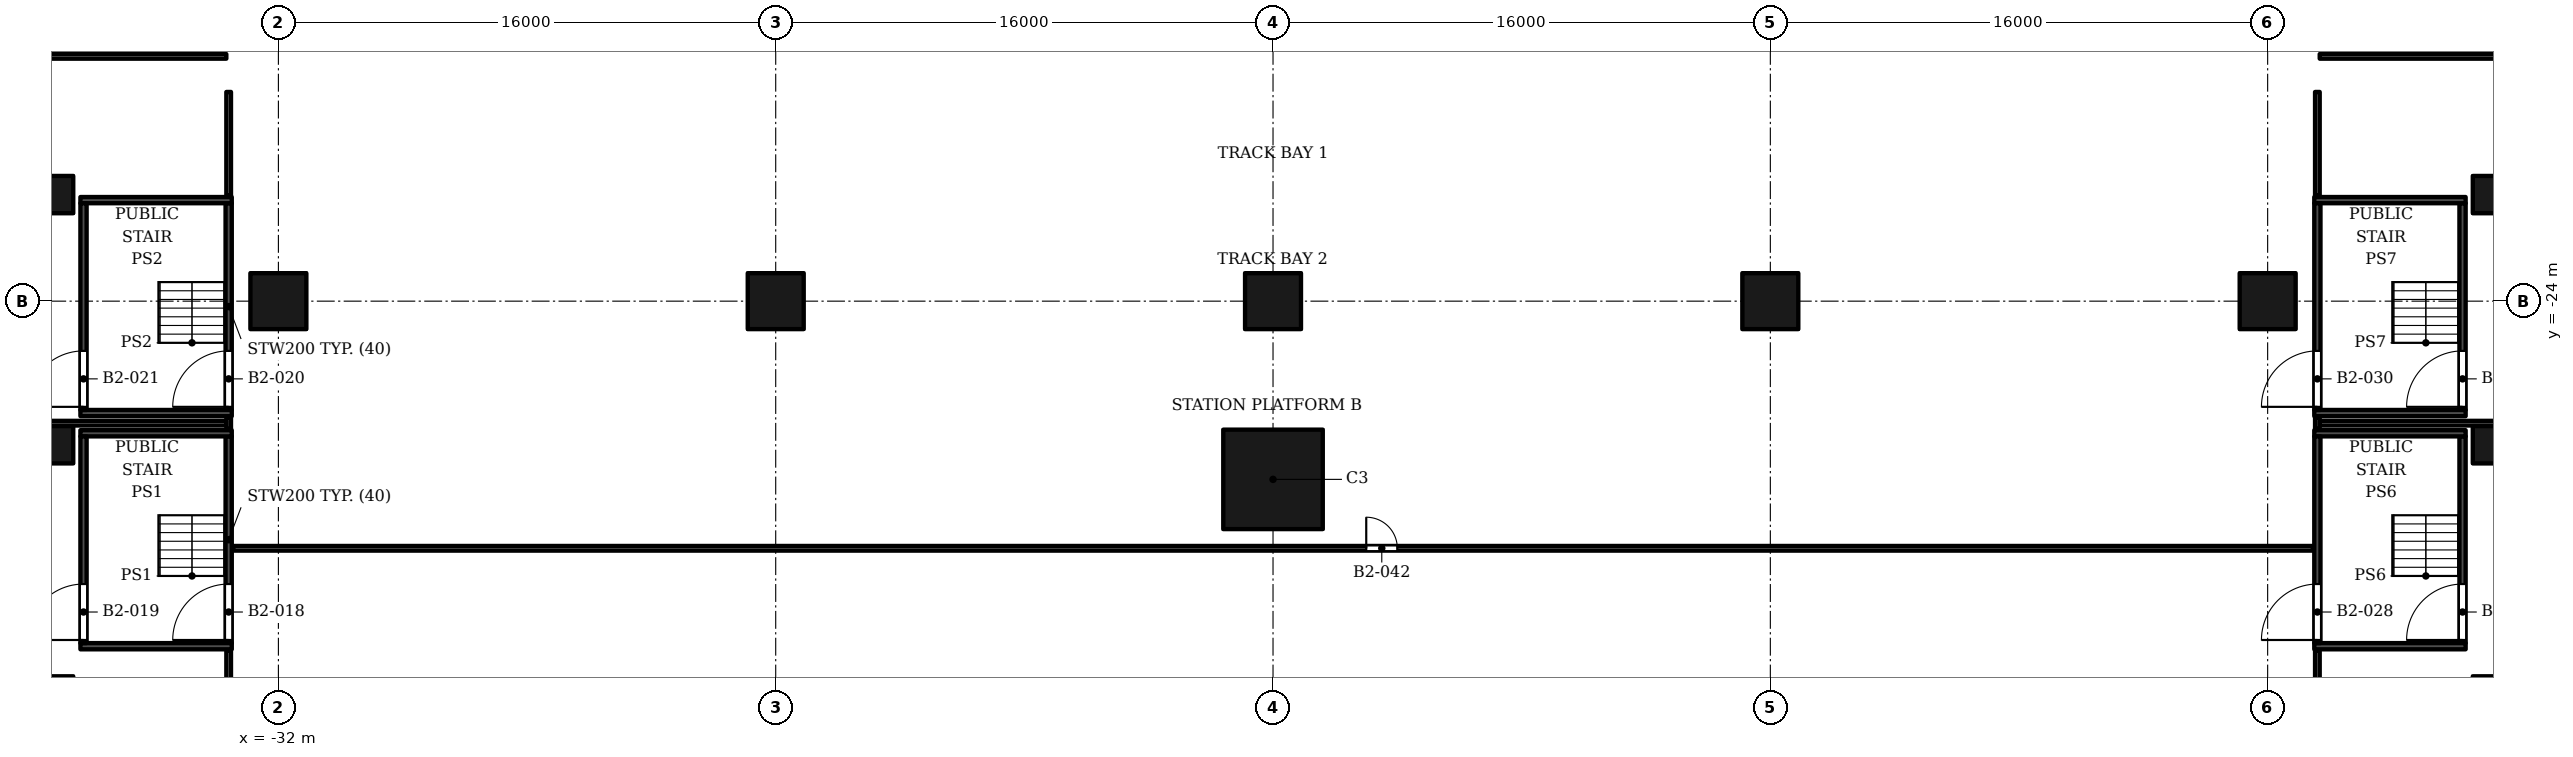
"""IFC4 building model, lengths in metres.
Left out: names, types, materials, properties, quantities, classifications, styles, units other than length and angle.
Written with IfcOpenShell. Run it as: python <this file> out.ifc"""

import sys

from ifc_helpers import new_model, si_unit, direction, frame, frame_2d, origin, origin_2d, place, context, subcontext, project, spatial, rectangle, extrude, element, fill, save


model = new_model("IFC4")
c1 = context("Model", 3, precision=1e-05, world=origin(), true_north=direction((0.0, 1.0)))
c2 = subcontext(c1, "Body", "Model", "MODEL_VIEW")
j1 = project(units=[si_unit("LENGTHUNIT", "METRE"), si_unit("PLANEANGLEUNIT", "RADIAN")], contexts=[c1])
p1 = place(None, origin())
s1 = spatial("IfcSite", under=j1, at=p1, CompositionType="ELEMENT")
p2 = place(p1, origin())
s2 = spatial("IfcBuilding", under=s1, at=p2, CompositionType="ELEMENT")
p3 = place(p2, frame((0.0, 0.0, -10.0)))
s3 = spatial("IfcBuildingStorey", under=s2, at=p3, CompositionType="ELEMENT", Elevation=-10.0)
for number, where, z_axis, x_axis in (
    (1, (-32.0, -24.0, -1.6), (0.0, 0.0, 1.0), (1.0, 0.0, 0.0)),
    (2, (-16.0, -24.0, -1.6), (0.0, 0.0, 1.0), (1.0, 0.0, 0.0)),
    (3, (0.0, -24.0, -1.6), (0.0, 0.0, 1.0), (1.0, 0.0, 0.0)),
    (4, (16.0, -24.0, -1.6), (0.0, 0.0, 1.0), (1.0, 0.0, 0.0)),
    (5, (32.0, -24.0, -1.6), (0.0, 0.0, 1.0), (1.0, 0.0, 0.0)),
):
    element("IfcColumn", number, at=place(p3, frame(where, z_axis=z_axis, x_axis=x_axis)), inside=s3, PredefinedType="COLUMN", context=c2, shape_type="SweptSolid", body=[
        extrude(rectangle(XDim=1.8, YDim=1.8, at=origin_2d()), origin(), (0.0, 0.0, 1.0), 6.6),
    ])
for number, where, z_axis, x_axis in (
    (6, (-39.2, -36.669, -1.6), (0.0, 0.0, 1.0), (1.0, 0.0, 0.0)),
    (7, (39.2, -36.669, -1.6), (0.0, 0.0, 1.0), (1.0, 0.0, 0.0)),
    (8, (-39.2, -28.62, -1.6), (0.0, 0.0, 1.0), (1.0, 0.0, 0.0)),
    (9, (-39.2, -20.572, -1.6), (0.0, 0.0, 1.0), (1.0, 0.0, 0.0)),
    (10, (39.2, -20.572, -1.6), (0.0, 0.0, 1.0), (1.0, 0.0, 0.0)),
    (11, (39.2, -28.62, -1.6), (0.0, 0.0, 1.0), (1.0, 0.0, 0.0)),
):
    element("IfcColumn", number, at=place(p3, frame(where, z_axis=z_axis, x_axis=x_axis)), inside=s3, PredefinedType="COLUMN", context=c2, shape_type="SweptSolid", body=[
        extrude(rectangle(XDim=1.2, YDim=1.2, at=origin_2d()), origin(), (0.0, 0.0, 1.0), 6.6),
    ])
p4 = place(p3, frame((0.0, -29.733, -1.6), z_axis=(0.0, 0.0, 1.0), x_axis=(0.0, 1.0, 0.0)))
e12 = element("IfcColumn", 12, at=p4, inside=s3, PredefinedType="COLUMN", context=c2, shape_type="SweptSolid", body=[
    extrude(rectangle(XDim=3.2, YDim=3.2, at=origin_2d()), origin(), (0.0, 0.0, 1.0), 6.6),
])
for number, where, z_axis, x_axis in (
    (13, (-38.37, -35.1, 0.0), (0.0, 0.0, 1.0), (1.0, 0.0, 0.0)),
    (14, (-38.37, -28.25, 0.0), (0.0, 0.0, 1.0), (1.0, 0.0, 0.0)),
):
    element("IfcWall", number, at=place(p3, frame(where, z_axis=z_axis, x_axis=x_axis)), inside=s3, PredefinedType="SOLIDWALL", context=c2, shape_type="SweptSolid", body=[
        extrude(rectangle(XDim=4.87, YDim=0.2, at=frame_2d((2.435, 0.0))), origin(), (0.0, 0.0, 1.0), 4.5),
    ])
p5 = place(p3, frame((-38.27, -35.0, 0.0), z_axis=(0.0, 0.0, 1.0), x_axis=(0.0, 1.0, 0.0)))
e15 = element("IfcWall", 15, at=p5, inside=s3, PredefinedType="SOLIDWALL", context=c2, shape_type="SweptSolid", body=[
    extrude(rectangle(XDim=6.65, YDim=0.2, at=frame_2d((3.325, 0.0))), origin(), (0.0, 0.0, 1.0), 4.5),
])
p6 = place(p5, frame((0.1, 0.0, 0.0)))
e16 = element("IfcOpeningElement", 16, at=p6, cuts=e15, PredefinedType="OPENING", context=c2, shape_type="SweptSolid", body=[
    extrude(rectangle(XDim=1.8, YDim=2.4, at=frame_2d((0.9, 1.2))), frame((0.0, 0.11, 0.0), z_axis=(0.0, -1.0, 0.0), x_axis=(1.0, 0.0, 0.0)), (0.0, 0.0, 1.0), 0.22),
])
p7 = place(p3, frame((-33.6, -35.0, 0.0), z_axis=(0.0, 0.0, 1.0), x_axis=(0.0, 1.0, 0.0)))
e17 = element("IfcWall", 17, at=p7, inside=s3, PredefinedType="SOLIDWALL", context=c2, shape_type="SweptSolid", body=[
    extrude(rectangle(XDim=6.65, YDim=0.2, at=frame_2d((3.325, 0.0))), origin(), (0.0, 0.0, 1.0), 4.5),
])
p8 = place(p7, frame((0.1, 0.0, 0.0)))
e18 = element("IfcOpeningElement", 18, at=p8, cuts=e17, PredefinedType="OPENING", context=c2, shape_type="SweptSolid", body=[
    extrude(rectangle(XDim=1.8, YDim=2.4, at=frame_2d((0.9, 1.2))), frame((0.0, 0.11, 0.0), z_axis=(0.0, -1.0, 0.0), x_axis=(1.0, 0.0, 0.0)), (0.0, 0.0, 1.0), 0.22),
])
for number, where, z_axis, x_axis in (
    (19, (-38.37, -27.6, 0.0), (0.0, 0.0, 1.0), (1.0, 0.0, 0.0)),
    (20, (-38.37, -20.75, 0.0), (0.0, 0.0, 1.0), (1.0, 0.0, 0.0)),
):
    element("IfcWall", number, at=place(p3, frame(where, z_axis=z_axis, x_axis=x_axis)), inside=s3, PredefinedType="SOLIDWALL", context=c2, shape_type="SweptSolid", body=[
        extrude(rectangle(XDim=4.87, YDim=0.2, at=frame_2d((2.435, 0.0))), origin(), (0.0, 0.0, 1.0), 4.5),
    ])
p9 = place(p3, frame((-38.27, -27.5, 0.0), z_axis=(0.0, 0.0, 1.0), x_axis=(0.0, 1.0, 0.0)))
e21 = element("IfcWall", 21, at=p9, inside=s3, PredefinedType="SOLIDWALL", context=c2, shape_type="SweptSolid", body=[
    extrude(rectangle(XDim=6.65, YDim=0.2, at=frame_2d((3.325, 0.0))), origin(), (0.0, 0.0, 1.0), 4.5),
])
p10 = place(p9, frame((0.1, 0.0, 0.0)))
e22 = element("IfcOpeningElement", 22, at=p10, cuts=e21, PredefinedType="OPENING", context=c2, shape_type="SweptSolid", body=[
    extrude(rectangle(XDim=1.8, YDim=2.4, at=frame_2d((0.9, 1.2))), frame((0.0, 0.11, 0.0), z_axis=(0.0, -1.0, 0.0), x_axis=(1.0, 0.0, 0.0)), (0.0, 0.0, 1.0), 0.22),
])
p11 = place(p3, frame((-33.6, -27.5, 0.0), z_axis=(0.0, 0.0, 1.0), x_axis=(0.0, 1.0, 0.0)))
e23 = element("IfcWall", 23, at=p11, inside=s3, PredefinedType="SOLIDWALL", context=c2, shape_type="SweptSolid", body=[
    extrude(rectangle(XDim=6.65, YDim=0.2, at=frame_2d((3.325, 0.0))), origin(), (0.0, 0.0, 1.0), 4.5),
])
p12 = place(p11, frame((0.1, 0.0, 0.0)))
e24 = element("IfcOpeningElement", 24, at=p12, cuts=e23, PredefinedType="OPENING", context=c2, shape_type="SweptSolid", body=[
    extrude(rectangle(XDim=1.8, YDim=2.4, at=frame_2d((0.9, 1.2))), frame((0.0, 0.11, 0.0), z_axis=(0.0, -1.0, 0.0), x_axis=(1.0, 0.0, 0.0)), (0.0, 0.0, 1.0), 0.22),
])
for number, where, z_axis, x_axis in (
    (25, (33.5, -35.1, 0.0), (0.0, 0.0, 1.0), (1.0, 0.0, 0.0)),
    (26, (33.5, -28.25, 0.0), (0.0, 0.0, 1.0), (1.0, 0.0, 0.0)),
):
    element("IfcWall", number, at=place(p3, frame(where, z_axis=z_axis, x_axis=x_axis)), inside=s3, PredefinedType="SOLIDWALL", context=c2, shape_type="SweptSolid", body=[
        extrude(rectangle(XDim=4.87, YDim=0.2, at=frame_2d((2.435, 0.0))), origin(), (0.0, 0.0, 1.0), 4.5),
    ])
p13 = place(p3, frame((33.6, -35.0, 0.0), z_axis=(0.0, 0.0, 1.0), x_axis=(0.0, 1.0, 0.0)))
e27 = element("IfcWall", 27, at=p13, inside=s3, PredefinedType="SOLIDWALL", context=c2, shape_type="SweptSolid", body=[
    extrude(rectangle(XDim=6.65, YDim=0.2, at=frame_2d((3.325, 0.0))), origin(), (0.0, 0.0, 1.0), 4.5),
])
p14 = place(p13, frame((0.1, 0.0, 0.0)))
e28 = element("IfcOpeningElement", 28, at=p14, cuts=e27, PredefinedType="OPENING", context=c2, shape_type="SweptSolid", body=[
    extrude(rectangle(XDim=1.8, YDim=2.4, at=frame_2d((0.9, 1.2))), frame((0.0, 0.11, 0.0), z_axis=(0.0, -1.0, 0.0), x_axis=(1.0, 0.0, 0.0)), (0.0, 0.0, 1.0), 0.22),
])
p15 = place(p3, frame((38.27, -35.0, 0.0), z_axis=(0.0, 0.0, 1.0), x_axis=(0.0, 1.0, 0.0)))
e29 = element("IfcWall", 29, at=p15, inside=s3, PredefinedType="SOLIDWALL", context=c2, shape_type="SweptSolid", body=[
    extrude(rectangle(XDim=6.65, YDim=0.2, at=frame_2d((3.325, 0.0))), origin(), (0.0, 0.0, 1.0), 4.5),
])
p16 = place(p15, frame((0.1, 0.0, 0.0)))
e30 = element("IfcOpeningElement", 30, at=p16, cuts=e29, PredefinedType="OPENING", context=c2, shape_type="SweptSolid", body=[
    extrude(rectangle(XDim=1.8, YDim=2.4, at=frame_2d((0.9, 1.2))), frame((0.0, 0.11, 0.0), z_axis=(0.0, -1.0, 0.0), x_axis=(1.0, 0.0, 0.0)), (0.0, 0.0, 1.0), 0.22),
])
for number, where, z_axis, x_axis in (
    (31, (33.5, -27.6, 0.0), (0.0, 0.0, 1.0), (1.0, 0.0, 0.0)),
    (32, (33.5, -20.75, 0.0), (0.0, 0.0, 1.0), (1.0, 0.0, 0.0)),
):
    element("IfcWall", number, at=place(p3, frame(where, z_axis=z_axis, x_axis=x_axis)), inside=s3, PredefinedType="SOLIDWALL", context=c2, shape_type="SweptSolid", body=[
        extrude(rectangle(XDim=4.87, YDim=0.2, at=frame_2d((2.435, 0.0))), origin(), (0.0, 0.0, 1.0), 4.5),
    ])
p17 = place(p3, frame((33.6, -27.5, 0.0), z_axis=(0.0, 0.0, 1.0), x_axis=(0.0, 1.0, 0.0)))
e33 = element("IfcWall", 33, at=p17, inside=s3, PredefinedType="SOLIDWALL", context=c2, shape_type="SweptSolid", body=[
    extrude(rectangle(XDim=6.65, YDim=0.2, at=frame_2d((3.325, 0.0))), origin(), (0.0, 0.0, 1.0), 4.5),
])
p18 = place(p17, frame((0.1, 0.0, 0.0)))
e34 = element("IfcOpeningElement", 34, at=p18, cuts=e33, PredefinedType="OPENING", context=c2, shape_type="SweptSolid", body=[
    extrude(rectangle(XDim=1.8, YDim=2.4, at=frame_2d((0.9, 1.2))), frame((0.0, 0.11, 0.0), z_axis=(0.0, -1.0, 0.0), x_axis=(1.0, 0.0, 0.0)), (0.0, 0.0, 1.0), 0.22),
])
p19 = place(p3, frame((38.27, -27.5, 0.0), z_axis=(0.0, 0.0, 1.0), x_axis=(0.0, 1.0, 0.0)))
e35 = element("IfcWall", 35, at=p19, inside=s3, PredefinedType="SOLIDWALL", context=c2, shape_type="SweptSolid", body=[
    extrude(rectangle(XDim=6.65, YDim=0.2, at=frame_2d((3.325, 0.0))), origin(), (0.0, 0.0, 1.0), 4.5),
])
p20 = place(p19, frame((0.1, 0.0, 0.0)))
e36 = element("IfcOpeningElement", 36, at=p20, cuts=e35, PredefinedType="OPENING", context=c2, shape_type="SweptSolid", body=[
    extrude(rectangle(XDim=1.8, YDim=2.4, at=frame_2d((0.9, 1.2))), frame((0.0, 0.11, 0.0), z_axis=(0.0, -1.0, 0.0), x_axis=(1.0, 0.0, 0.0)), (0.0, 0.0, 1.0), 0.22),
])
for number, where, z_axis, x_axis in (
    (37, (-33.6, -44.6, 0.0), (0.0, 0.0, 1.0), (0.0, 1.0, 0.0)),
    (38, (33.6, -44.6, 0.0), (0.0, 0.0, 1.0), (0.0, 1.0, 0.0)),
):
    element("IfcWall", number, at=place(p3, frame(where, z_axis=z_axis, x_axis=x_axis)), inside=s3, PredefinedType="PARTITIONING", context=c2, shape_type="SweptSolid", body=[
        extrude(rectangle(XDim=9.36, YDim=0.15, at=frame_2d((4.68, 0.0))), origin(), (0.0, 0.0, 1.0), 3.3),
    ])
p21 = place(p3, frame((-33.46, -31.95, 0.0), z_axis=(0.0, 0.0, 1.0), x_axis=(1.0, 0.0, 0.0)))
e39 = element("IfcWall", 39, at=p21, inside=s3, PredefinedType="PARTITIONING", context=c2, shape_type="SweptSolid", body=[
    extrude(rectangle(XDim=66.92, YDim=0.15, at=frame_2d((33.46, 0.0))), origin(), (0.0, 0.0, 1.0), 3.3),
])
p22 = place(p21, frame((36.459, 0.0, 0.0)))
e40 = element("IfcOpeningElement", 40, at=p22, cuts=e39, PredefinedType="OPENING", context=c2, shape_type="SweptSolid", body=[
    extrude(rectangle(XDim=1.0, YDim=2.1, at=frame_2d((0.5, 1.05))), frame((0.0, 0.085, 0.0), z_axis=(0.0, -1.0, 0.0), x_axis=(1.0, 0.0, 0.0)), (0.0, 0.0, 1.0), 0.17),
])
for number, where, z_axis, x_axis in (
    (41, (-33.6, -28.11, 0.0), (0.0, 0.0, 1.0), (0.0, 1.0, 0.0)),
    (42, (33.6, -28.11, 0.0), (0.0, 0.0, 1.0), (0.0, 1.0, 0.0)),
):
    element("IfcWall", number, at=place(p3, frame(where, z_axis=z_axis, x_axis=x_axis)), inside=s3, PredefinedType="PARTITIONING", context=c2, shape_type="SweptSolid", body=[
        extrude(rectangle(XDim=0.37, YDim=0.15, at=frame_2d((0.185, 0.0))), origin(), (0.0, 0.0, 1.0), 4.5),
    ])
for number, where, z_axis, x_axis in (
    (43, (-49.775, -27.925, 0.0), (0.0, 0.0, 1.0), (1.0, 0.0, 0.0)),
    (44, (33.675, -27.925, 0.0), (0.0, 0.0, 1.0), (1.0, 0.0, 0.0)),
):
    element("IfcWall", number, at=place(p3, frame(where, z_axis=z_axis, x_axis=x_axis)), inside=s3, PredefinedType="PARTITIONING", context=c2, shape_type="SweptSolid", body=[
        extrude(rectangle(XDim=16.1, YDim=0.15, at=frame_2d((8.05, 0.0))), origin(), (0.0, 0.0, 1.0), 4.5),
    ])
for number, where, z_axis, x_axis in (
    (45, (-33.6, -20.61, 0.0), (0.0, 0.0, 1.0), (0.0, 1.0, 0.0)),
    (46, (33.6, -20.61, 0.0), (0.0, 0.0, 1.0), (0.0, 1.0, 0.0)),
):
    element("IfcWall", number, at=place(p3, frame(where, z_axis=z_axis, x_axis=x_axis)), inside=s3, PredefinedType="PARTITIONING", context=c2, shape_type="SweptSolid", body=[
        extrude(rectangle(XDim=3.34, YDim=0.15, at=frame_2d((1.67, 0.0))), origin(), (0.0, 0.0, 1.0), 4.5),
    ])
for number, where, z_axis, x_axis in (
    (47, (-49.775, -16.125, 0.0), (0.0, 0.0, 1.0), (1.0, 0.0, 0.0)),
    (48, (33.675, -16.125, 0.0), (0.0, 0.0, 1.0), (1.0, 0.0, 0.0)),
):
    element("IfcWall", number, at=place(p3, frame(where, z_axis=z_axis, x_axis=x_axis)), inside=s3, PredefinedType="PARTITIONING", context=c2, shape_type="SweptSolid", body=[
        extrude(rectangle(XDim=16.1, YDim=0.15, at=frame_2d((8.05, 0.0))), origin(), (0.0, 0.0, 1.0), 4.5),
    ])
p23 = place(p8, origin())
e49 = element("IfcDoor", 49, at=p23, inside=s3, OperationType="DOUBLE_DOOR_SINGLE_SWING", PredefinedType="DOOR", context=c2, shape_type="SweptSolid", body=[
    extrude(rectangle(XDim=1.8, YDim=2.4, at=frame_2d((0.9, 1.2))), frame((0.0, 0.025, 0.0), z_axis=(0.0, -1.0, 0.0), x_axis=(1.0, 0.0, 0.0)), (0.0, 0.0, 1.0), 0.05),
])
fill(e18, e49)
p24 = place(p6, origin())
e50 = element("IfcDoor", 50, at=p24, inside=s3, OperationType="DOUBLE_DOOR_SINGLE_SWING", PredefinedType="DOOR", context=c2, shape_type="SweptSolid", body=[
    extrude(rectangle(XDim=1.8, YDim=2.4, at=frame_2d((0.9, 1.2))), frame((0.0, 0.025, 0.0), z_axis=(0.0, -1.0, 0.0), x_axis=(1.0, 0.0, 0.0)), (0.0, 0.0, 1.0), 0.05),
])
fill(e16, e50)
p25 = place(p12, origin())
e51 = element("IfcDoor", 51, at=p25, inside=s3, OperationType="DOUBLE_DOOR_SINGLE_SWING", PredefinedType="DOOR", context=c2, shape_type="SweptSolid", body=[
    extrude(rectangle(XDim=1.8, YDim=2.4, at=frame_2d((0.9, 1.2))), frame((0.0, 0.025, 0.0), z_axis=(0.0, -1.0, 0.0), x_axis=(1.0, 0.0, 0.0)), (0.0, 0.0, 1.0), 0.05),
])
fill(e24, e51)
p26 = place(p10, origin())
e52 = element("IfcDoor", 52, at=p26, inside=s3, OperationType="DOUBLE_DOOR_SINGLE_SWING", PredefinedType="DOOR", context=c2, shape_type="SweptSolid", body=[
    extrude(rectangle(XDim=1.8, YDim=2.4, at=frame_2d((0.9, 1.2))), frame((0.0, 0.025, 0.0), z_axis=(0.0, -1.0, 0.0), x_axis=(1.0, 0.0, 0.0)), (0.0, 0.0, 1.0), 0.05),
])
fill(e22, e52)
p27 = place(p14, origin())
e53 = element("IfcDoor", 53, at=p27, inside=s3, OperationType="DOUBLE_DOOR_SINGLE_SWING", PredefinedType="DOOR", context=c2, shape_type="SweptSolid", body=[
    extrude(rectangle(XDim=1.8, YDim=2.4, at=frame_2d((0.9, 1.2))), frame((0.0, 0.025, 0.0), z_axis=(0.0, -1.0, 0.0), x_axis=(1.0, 0.0, 0.0)), (0.0, 0.0, 1.0), 0.05),
])
fill(e28, e53)
p28 = place(p16, origin())
e54 = element("IfcDoor", 54, at=p28, inside=s3, OperationType="DOUBLE_DOOR_SINGLE_SWING", PredefinedType="DOOR", context=c2, shape_type="SweptSolid", body=[
    extrude(rectangle(XDim=1.8, YDim=2.4, at=frame_2d((0.9, 1.2))), frame((0.0, 0.025, 0.0), z_axis=(0.0, -1.0, 0.0), x_axis=(1.0, 0.0, 0.0)), (0.0, 0.0, 1.0), 0.05),
])
fill(e30, e54)
p29 = place(p18, origin())
e55 = element("IfcDoor", 55, at=p29, inside=s3, OperationType="DOUBLE_DOOR_SINGLE_SWING", PredefinedType="DOOR", context=c2, shape_type="SweptSolid", body=[
    extrude(rectangle(XDim=1.8, YDim=2.4, at=frame_2d((0.9, 1.2))), frame((0.0, 0.025, 0.0), z_axis=(0.0, -1.0, 0.0), x_axis=(1.0, 0.0, 0.0)), (0.0, 0.0, 1.0), 0.05),
])
fill(e34, e55)
p30 = place(p20, origin())
e56 = element("IfcDoor", 56, at=p30, inside=s3, OperationType="DOUBLE_DOOR_SINGLE_SWING", PredefinedType="DOOR", context=c2, shape_type="SweptSolid", body=[
    extrude(rectangle(XDim=1.8, YDim=2.4, at=frame_2d((0.9, 1.2))), frame((0.0, 0.025, 0.0), z_axis=(0.0, -1.0, 0.0), x_axis=(1.0, 0.0, 0.0)), (0.0, 0.0, 1.0), 0.05),
])
fill(e36, e56)
p31 = place(p22, origin())
e57 = element("IfcDoor", 57, at=p31, inside=s3, OperationType="SINGLE_SWING_LEFT", PredefinedType="DOOR", context=c2, shape_type="SweptSolid", body=[
    extrude(rectangle(XDim=1.0, YDim=2.1, at=frame_2d((0.5, 1.05))), frame((0.0, 0.025, 0.0), z_axis=(0.0, -1.0, 0.0), x_axis=(1.0, 0.0, 0.0)), (0.0, 0.0, 1.0), 0.05),
])
fill(e40, e57)
save(model, sys.argv[1])
